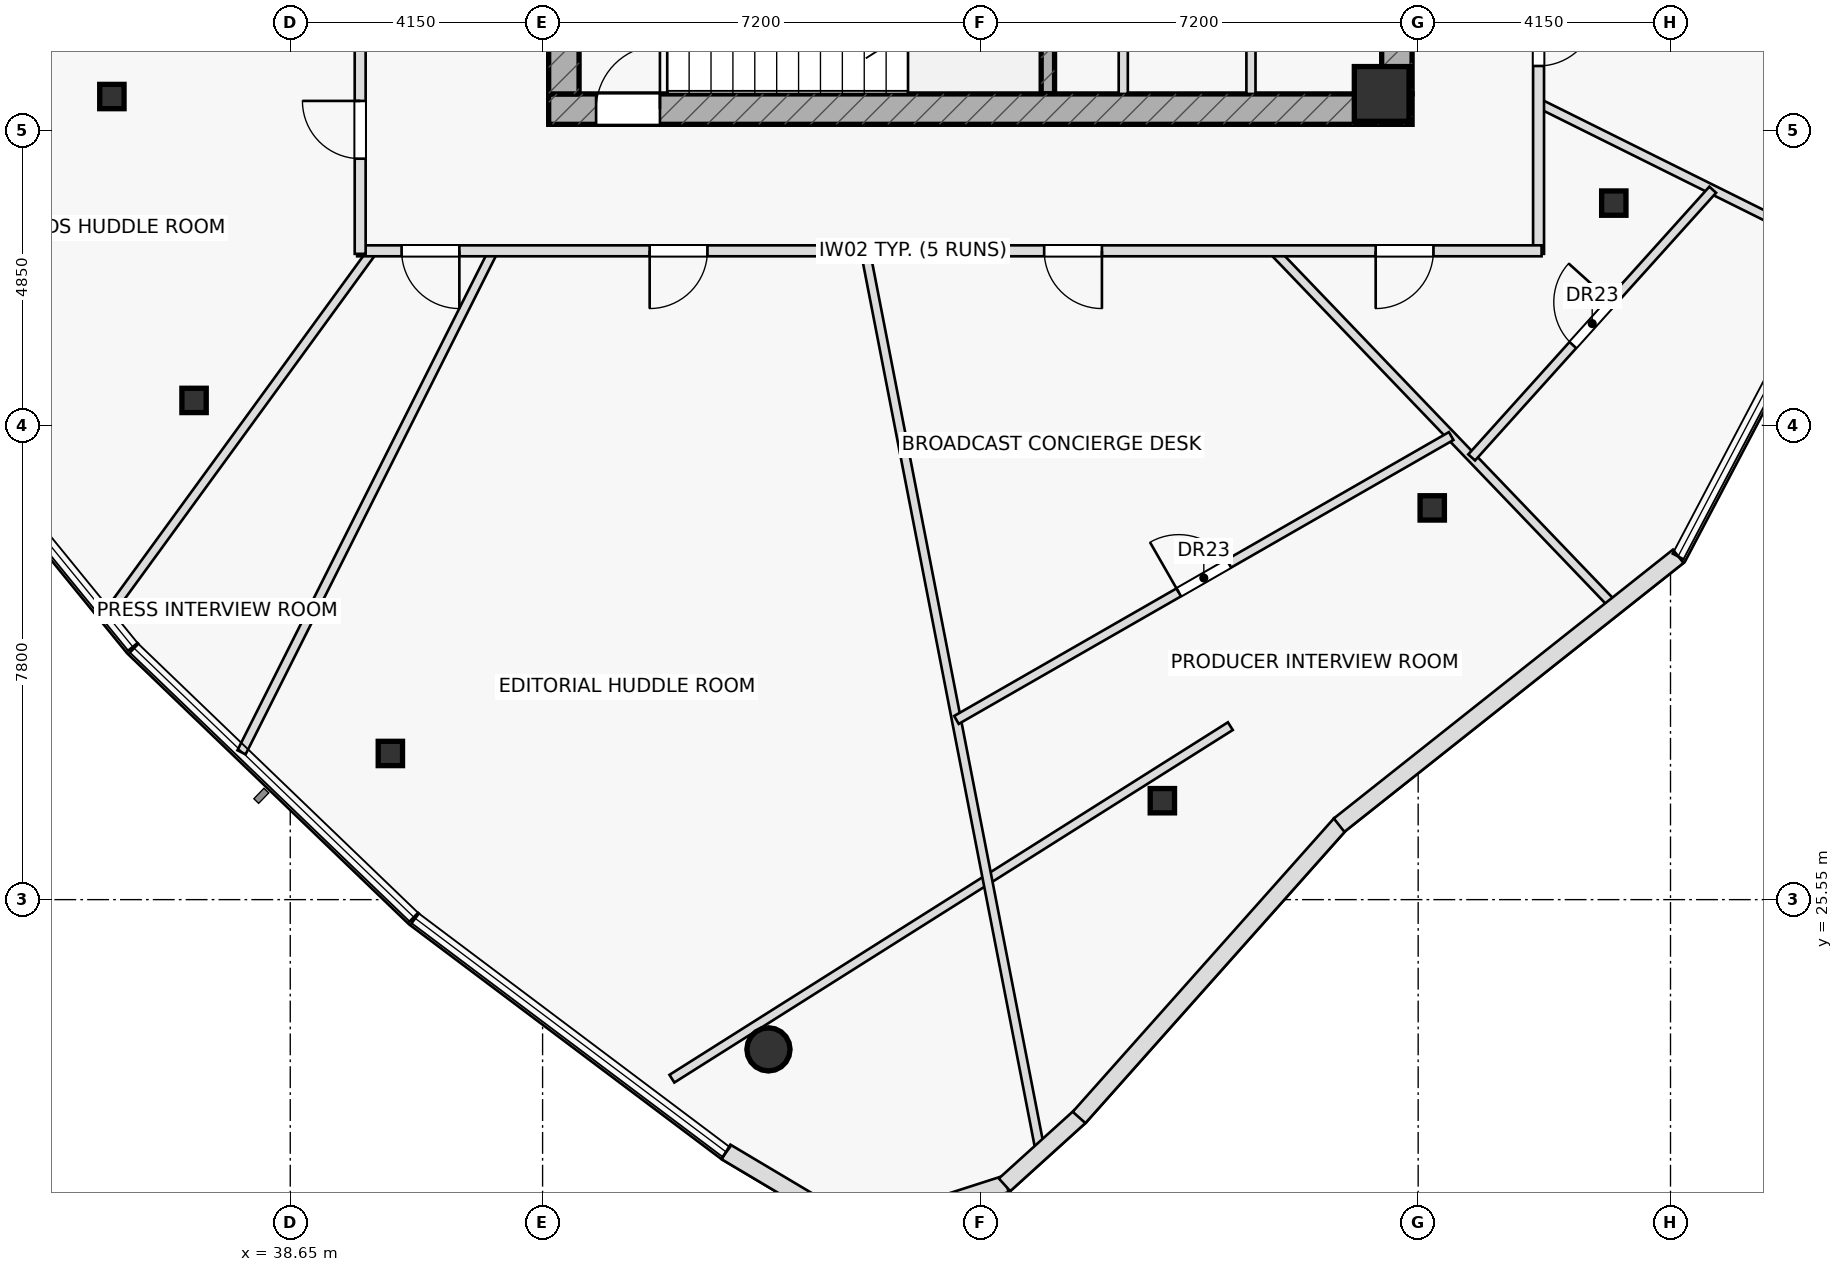
"""IFC4 building model, lengths in metres.
Left out: names, types, materials, properties, quantities, classifications, styles, units other than length and angle.
Written with IfcOpenShell. Run it as: python <this file> out.ifc"""

import sys

from ifc_helpers import new_model, si_unit, direction, frame, frame_2d, origin, origin_2d, place, context, subcontext, project, spatial, rectangle, hollow_rectangle, hollow_circle, extrude, element, fill, save


model = new_model("IFC4")
c1 = context("Model", 3, precision=1e-05, world=origin(), true_north=direction((0.0, 1.0)))
c2 = subcontext(c1, "Body", "Model", "MODEL_VIEW")
j1 = project(units=[si_unit("LENGTHUNIT", "METRE"), si_unit("PLANEANGLEUNIT", "RADIAN")], contexts=[c1])
p1 = place(None, origin())
s1 = spatial("IfcSite", under=j1, at=p1, CompositionType="ELEMENT")
p2 = place(p1, origin())
s2 = spatial("IfcBuilding", under=s1, at=p2, CompositionType="ELEMENT")
p3 = place(p2, frame((0.0, 0.0, 321.5)))
s3 = spatial("IfcBuildingStorey", under=s2, at=p3, CompositionType="ELEMENT", Elevation=321.5)
p4 = place(p3, frame((51.11, 38.8, 0.0), z_axis=(0.0, 0.0, 1.0), x_axis=(0.0, 1.0, 0.0)))
e1 = element("IfcWall", 1, at=p4, inside=s3, PredefinedType="SHEAR", context=c2, shape_type="SweptSolid", body=[
    extrude(rectangle(XDim=3.1, YDim=0.22, at=frame_2d((1.55, 0.0))), origin(), (0.0, 0.0, 1.0), 3.55),
])
p5 = place(p3, frame((42.9, 38.55, 0.0), z_axis=(0.0, 0.0, 1.0), x_axis=(1.0, 0.0, 0.0)))
e2 = element("IfcWall", 2, at=p5, inside=s3, PredefinedType="SHEAR", context=c2, shape_type="SweptSolid", body=[
    extrude(rectangle(XDim=14.2, YDim=0.5, at=frame_2d((7.1, 0.0))), origin(), (0.0, 0.0, 1.0), 3.55),
])
p6 = place(p5, frame((0.78, 0.0, 0.0)))
e3 = element("IfcOpeningElement", 3, at=p6, cuts=e2, PredefinedType="OPENING", context=c2, shape_type="SweptSolid", body=[
    extrude(rectangle(XDim=1.05, YDim=2.2, at=frame_2d((0.525, 1.1))), frame((0.0, 0.26, 0.0), z_axis=(0.0, -1.0, 0.0), x_axis=(1.0, 0.0, 0.0)), (0.0, 0.0, 1.0), 0.52),
])
p7 = place(p3, frame((43.15, 38.8, 0.0), z_axis=(0.0, 0.0, 1.0), x_axis=(0.0, 1.0, 0.0)))
e4 = element("IfcWall", 4, at=p7, inside=s3, PredefinedType="SHEAR", context=c2, shape_type="SweptSolid", body=[
    extrude(rectangle(XDim=12.4, YDim=0.5, at=frame_2d((6.2, 0.0))), origin(), (0.0, 0.0, 1.0), 3.55),
])
p8 = place(p3, frame((56.85, 38.8, 0.0), z_axis=(0.0, 0.0, 1.0), x_axis=(0.0, 1.0, 0.0)))
e5 = element("IfcWall", 5, at=p8, inside=s3, PredefinedType="SHEAR", context=c2, shape_type="SweptSolid", body=[
    extrude(rectangle(XDim=12.4, YDim=0.5, at=frame_2d((6.2, 0.0))), origin(), (0.0, 0.0, 1.0), 3.55),
])
p9 = place(p8, frame((3.85, 0.0, 0.0)))
e6 = element("IfcOpeningElement", 6, at=p9, cuts=e5, PredefinedType="OPENING", context=c2, shape_type="SweptSolid", body=[
    extrude(rectangle(XDim=1.5, YDim=2.2, at=frame_2d((0.75, 1.1))), frame((0.0, 0.26, 0.0), z_axis=(0.0, -1.0, 0.0), x_axis=(1.0, 0.0, 0.0)), (0.0, 0.0, 1.0), 0.52),
])
p10 = place(p3, frame((56.6, 38.8, 0.0), z_axis=(0.0, 0.0, 1.0), x_axis=(1.0, 0.0, 0.0)))
e7 = element("IfcColumn", 7, at=p10, inside=s3, PredefinedType="COLUMN", context=c2, shape_type="SweptSolid", body=[
    extrude(rectangle(XDim=0.9, YDim=0.9, at=origin_2d()), origin(), (0.0, 0.0, 1.0), 3.55),
])
for number, where, z_axis, x_axis in (
    (8, (35.717, 38.757, 0.0), (0.0, 0.0, 1.0), (1.0, 0.0, 0.0)),
    (9, (37.068, 33.76, 0.0), (0.0, 0.0, 1.0), (1.0, 0.0, 0.0)),
    (10, (40.296, 27.954, 0.0), (0.0, 0.0, 1.0), (1.0, 0.0, 0.0)),
):
    element("IfcColumn", number, at=place(p3, frame(where, z_axis=z_axis, x_axis=x_axis)), inside=s3, PredefinedType="COLUMN", context=c2, shape_type="SweptSolid", body=[
        extrude(hollow_rectangle(XDim=0.4, YDim=0.4, WallThickness=0.025, at=origin_2d()), origin(), (0.0, 0.0, 1.0), 3.55),
    ])
p11 = place(p3, frame((46.515, 23.087, 0.0), z_axis=(0.0, 0.0, 1.0), x_axis=(1.0, 0.0, 0.0)))
e11 = element("IfcColumn", 11, at=p11, inside=s3, PredefinedType="COLUMN", context=c2, shape_type="SweptSolid", body=[
    extrude(hollow_circle(Radius=0.355, WallThickness=0.032, at=origin_2d()), origin(), (0.0, 0.0, 1.0), 3.55),
])
for number, where, z_axis, x_axis in (
    (12, (52.993, 27.177, 0.0), (0.0, 0.0, 1.0), (1.0, 0.0, 0.0)),
    (13, (57.431, 31.992, 0.0), (0.0, 0.0, 1.0), (1.0, 0.0, 0.0)),
    (14, (60.417, 37.004, 0.0), (0.0, 0.0, 1.0), (1.0, 0.0, 0.0)),
):
    element("IfcColumn", number, at=place(p3, frame(where, z_axis=z_axis, x_axis=x_axis)), inside=s3, PredefinedType="COLUMN", context=c2, shape_type="SweptSolid", body=[
        extrude(hollow_rectangle(XDim=0.4, YDim=0.4, WallThickness=0.025, at=origin_2d()), origin(), (0.0, 0.0, 1.0), 3.55),
    ])
for number, where, z_axis, x_axis in (
    (15, (52.35, 38.8, 0.0), (0.0, 0.0, 1.0), (0.0, 1.0, 0.0)),
    (16, (54.45, 38.8, 0.0), (0.0, 0.0, 1.0), (0.0, 1.0, 0.0)),
):
    element("IfcWall", number, at=place(p3, frame(where, z_axis=z_axis, x_axis=x_axis)), inside=s3, PredefinedType="PARTITIONING", context=c2, shape_type="SweptSolid", body=[
        extrude(rectangle(XDim=3.1, YDim=0.15, at=frame_2d((1.55, 0.0))), origin(), (0.0, 0.0, 1.0), 3.55),
    ])
p12 = place(p3, frame((44.927, 22.605, 0.0), z_axis=(0.0, 0.0, 1.0), x_axis=(0.845624548895, 0.533778158326, 0.0)))
e17 = element("IfcWall", 17, at=p12, inside=s3, PredefinedType="PARTITIONING", context=c2, shape_type="SweptSolid", body=[
    extrude(rectangle(XDim=10.861, YDim=0.15, at=frame_2d((5.431, 0.0))), origin(), (0.0, 0.0, 1.0), 3.075),
])
p13 = place(p3, frame((48.107, 36.22, 0.0), z_axis=(0.0, 0.0, 1.0), x_axis=(0.190804372381, -0.981628082056, 0.0)))
e18 = element("IfcWall", 18, at=p13, inside=s3, PredefinedType="PARTITIONING", context=c2, shape_type="SweptSolid", body=[
    extrude(rectangle(XDim=15.114, YDim=0.15, at=frame_2d((7.557, 0.0))), origin(), (0.0, 0.0, 1.0), 3.125),
])
p14 = place(p3, frame((54.821, 36.22, 0.0), z_axis=(0.0, 0.0, 1.0), x_axis=(0.69220120833, -0.721704570573, 0.0)))
e19 = element("IfcWall", 19, at=p14, inside=s3, PredefinedType="PARTITIONING", context=c2, shape_type="SweptSolid", body=[
    extrude(rectangle(XDim=8.118, YDim=0.15, at=frame_2d((4.059, 0.0))), origin(), (0.0, 0.0, 1.0), 3.075),
])
p15 = place(p3, frame((59.18, 38.648, 0.0), z_axis=(0.0, 0.0, 1.0), x_axis=(0.895495908624, -0.445069744689, 0.0)))
e20 = element("IfcWall", 20, at=p15, inside=s3, PredefinedType="PARTITIONING", context=c2, shape_type="SweptSolid", body=[
    extrude(rectangle(XDim=5.515, YDim=0.15, at=frame_2d((2.758, 0.0))), origin(), (0.0, 0.0, 1.0), 3.125),
])
p16 = place(p3, frame((37.08, 41.924, 0.0), z_axis=(0.0, 0.0, 1.0), x_axis=(-0.949625538611, -0.313386879778, 0.0)))
e21 = element("IfcWall", 21, at=p16, inside=s3, PredefinedType="PARTITIONING", context=c2, shape_type="SweptSolid", body=[
    extrude(rectangle(XDim=8.409, YDim=0.15, at=frame_2d((4.205, 0.0))), origin(), (0.0, 0.0, 1.0), 3.125),
])
p17 = place(p16, frame((1.35, 0.0, 0.0)))
e22 = element("IfcOpeningElement", 22, at=p17, cuts=e21, PredefinedType="OPENING", context=c2, shape_type="SweptSolid", body=[
    extrude(rectangle(XDim=0.95, YDim=2.05, at=frame_2d((0.475, 1.025))), frame((0.0, 0.085, 0.0), z_axis=(0.0, -1.0, 0.0), x_axis=(1.0, 0.0, 0.0)), (0.0, 0.0, 1.0), 0.17),
])
p18 = place(p3, frame((40.005, 36.22, 0.0), z_axis=(0.0, 0.0, 1.0), x_axis=(-0.58875799432, -0.808309361646, 0.0)))
e23 = element("IfcWall", 23, at=p18, inside=s3, PredefinedType="PARTITIONING", context=c2, shape_type="SweptSolid", body=[
    extrude(rectangle(XDim=7.426, YDim=0.15, at=frame_2d((3.713, 0.0))), origin(), (0.0, 0.0, 1.0), 3.075),
])
p19 = place(p3, frame((41.99, 36.22, 0.0), z_axis=(0.0, 0.0, 1.0), x_axis=(-0.448789550097, -0.893637476678, 0.0)))
e24 = element("IfcWall", 24, at=p19, inside=s3, PredefinedType="PARTITIONING", context=c2, shape_type="SweptSolid", body=[
    extrude(rectangle(XDim=9.229, YDim=0.15, at=frame_2d((4.615, 0.0))), origin(), (0.0, 0.0, 1.0), 3.125),
])
p20 = place(p3, frame((49.606, 28.505, 0.0), z_axis=(0.0, 0.0, 1.0), x_axis=(0.867373766806, 0.497657260227, 0.0)))
e25 = element("IfcWall", 25, at=p20, inside=s3, PredefinedType="PARTITIONING", context=c2, shape_type="SweptSolid", body=[
    extrude(rectangle(XDim=9.381, YDim=0.15, at=frame_2d((4.69, 0.0))), origin(), (0.0, 0.0, 1.0), 3.075),
])
p21 = place(p20, frame((4.215, 0.0, 0.0)))
e26 = element("IfcOpeningElement", 26, at=p21, cuts=e25, PredefinedType="OPENING", context=c2, shape_type="SweptSolid", body=[
    extrude(rectangle(XDim=0.95, YDim=2.05, at=frame_2d((0.475, 1.025))), frame((0.0, 0.085, 0.0), z_axis=(0.0, -1.0, 0.0), x_axis=(1.0, 0.0, 0.0)), (0.0, 0.0, 1.0), 0.17),
])
p22 = place(p3, frame((58.08, 32.822, 0.0), z_axis=(0.0, 0.0, 1.0), x_axis=(0.669174172191, 0.743105596314, 0.0)))
e27 = element("IfcWall", 27, at=p22, inside=s3, PredefinedType="PARTITIONING", context=c2, shape_type="SweptSolid", body=[
    extrude(rectangle(XDim=5.924, YDim=0.15, at=frame_2d((2.962, 0.0))), origin(), (0.0, 0.0, 1.0), 3.125),
])
p23 = place(p22, frame((2.487, 0.0, 0.0)))
e28 = element("IfcOpeningElement", 28, at=p23, cuts=e27, PredefinedType="OPENING", context=c2, shape_type="SweptSolid", body=[
    extrude(rectangle(XDim=0.95, YDim=2.05, at=frame_2d((0.475, 1.025))), frame((0.0, 0.085, 0.0), z_axis=(0.0, -1.0, 0.0), x_axis=(1.0, 0.0, 0.0)), (0.0, 0.0, 1.0), 0.17),
])
p24 = place(p3, frame((59.18, 41.1, 0.0), z_axis=(0.0, 0.0, 1.0), x_axis=(0.0, -1.0, 0.0)))
e29 = element("IfcWall", 29, at=p24, inside=s3, PredefinedType="PARTITIONING", context=c2, shape_type="SweptSolid", body=[
    extrude(rectangle(XDim=4.93, YDim=0.18, at=frame_2d((2.465, 0.0))), origin(), (0.0, 0.0, 1.0), 3.325),
])
p25 = place(p24, frame((0.89, 0.0, 0.0)))
e30 = element("IfcOpeningElement", 30, at=p25, cuts=e29, PredefinedType="OPENING", context=c2, shape_type="SweptSolid", body=[
    extrude(rectangle(XDim=0.95, YDim=2.05, at=frame_2d((0.475, 1.025))), frame((0.0, 0.1, 0.0), z_axis=(0.0, -1.0, 0.0), x_axis=(1.0, 0.0, 0.0)), (0.0, 0.0, 1.0), 0.2),
])
p26 = place(p3, frame((59.23, 36.22, 0.0), z_axis=(0.0, 0.0, 1.0), x_axis=(-1.0, 0.0, 0.0)))
e31 = element("IfcWall", 31, at=p26, inside=s3, PredefinedType="PARTITIONING", context=c2, shape_type="SweptSolid", body=[
    extrude(rectangle(XDim=19.48, YDim=0.18, at=frame_2d((9.74, 0.0))), origin(), (0.0, 0.0, 1.0), 3.075),
])
p27 = place(p26, frame((1.779, 0.0, 0.0)))
e32 = element("IfcOpeningElement", 32, at=p27, cuts=e31, PredefinedType="OPENING", context=c2, shape_type="SweptSolid", body=[
    extrude(rectangle(XDim=0.95, YDim=2.05, at=frame_2d((0.475, 1.025))), frame((0.0, 0.1, 0.0), z_axis=(0.0, -1.0, 0.0), x_axis=(1.0, 0.0, 0.0)), (0.0, 0.0, 1.0), 0.2),
])
p28 = place(p26, frame((7.231, 0.0, 0.0)))
e33 = element("IfcOpeningElement", 33, at=p28, cuts=e31, PredefinedType="OPENING", context=c2, shape_type="SweptSolid", body=[
    extrude(rectangle(XDim=0.95, YDim=2.05, at=frame_2d((0.475, 1.025))), frame((0.0, 0.1, 0.0), z_axis=(0.0, -1.0, 0.0), x_axis=(1.0, 0.0, 0.0)), (0.0, 0.0, 1.0), 0.2),
])
p29 = place(p26, frame((13.719, 0.0, 0.0)))
e34 = element("IfcOpeningElement", 34, at=p29, cuts=e31, PredefinedType="OPENING", context=c2, shape_type="SweptSolid", body=[
    extrude(rectangle(XDim=0.95, YDim=2.05, at=frame_2d((0.475, 1.025))), frame((0.0, 0.1, 0.0), z_axis=(0.0, -1.0, 0.0), x_axis=(1.0, 0.0, 0.0)), (0.0, 0.0, 1.0), 0.2),
])
p30 = place(p26, frame((17.799, 0.0, 0.0)))
e35 = element("IfcOpeningElement", 35, at=p30, cuts=e31, PredefinedType="OPENING", context=c2, shape_type="SweptSolid", body=[
    extrude(rectangle(XDim=0.95, YDim=2.05, at=frame_2d((0.475, 1.025))), frame((0.0, 0.1, 0.0), z_axis=(0.0, -1.0, 0.0), x_axis=(1.0, 0.0, 0.0)), (0.0, 0.0, 1.0), 0.2),
])
p31 = place(p3, frame((39.8, 36.17, 0.0), z_axis=(0.0, 0.0, 1.0), x_axis=(0.0, 1.0, 0.0)))
e36 = element("IfcWall", 36, at=p31, inside=s3, PredefinedType="PARTITIONING", context=c2, shape_type="SweptSolid", body=[
    extrude(rectangle(XDim=4.08, YDim=0.18, at=frame_2d((2.04, 0.0))), origin(), (0.0, 0.0, 1.0), 3.325),
])
p32 = place(p31, frame((1.565, 0.0, 0.0)))
e37 = element("IfcOpeningElement", 37, at=p32, cuts=e36, PredefinedType="OPENING", context=c2, shape_type="SweptSolid", body=[
    extrude(rectangle(XDim=0.95, YDim=2.05, at=frame_2d((0.475, 1.025))), frame((0.0, 0.1, 0.0), z_axis=(0.0, -1.0, 0.0), x_axis=(1.0, 0.0, 0.0)), (0.0, 0.0, 1.0), 0.2),
])
p33 = place(p3, frame((45.817, 21.401, 0.0), z_axis=(0.0, 0.0, 1.0), x_axis=(0.859459534557, -0.51120378369, 0.0)))
e38 = element("IfcWall", 38, at=p33, inside=s3, PredefinedType="STANDARD", context=c2, shape_type="SweptSolid", body=[
    extrude(rectangle(XDim=1.671, YDim=0.28, at=frame_2d((0.835, 0.0))), origin(), (0.0, 0.0, 1.0), 3.55),
])
p34 = place(p3, frame((48.844, 20.367, 0.0), z_axis=(0.0, 0.0, 1.0), x_axis=(0.951856918908, 0.306542665752, 0.0)))
e39 = element("IfcWall", 39, at=p34, inside=s3, PredefinedType="STANDARD", context=c2, shape_type="SweptSolid", body=[
    extrude(rectangle(XDim=1.659, YDim=0.28, at=frame_2d((0.83, 0.0))), origin(), (0.0, 0.0, 1.0), 3.55),
])
p35 = place(p3, frame((50.398, 20.861, 0.0), z_axis=(0.0, 0.0, 1.0), x_axis=(0.741370646034, 0.671095794354, 0.0)))
e40 = element("IfcWall", 40, at=p35, inside=s3, PredefinedType="STANDARD", context=c2, shape_type="SweptSolid", body=[
    extrude(rectangle(XDim=1.681, YDim=0.28, at=frame_2d((0.841, 0.0))), origin(), (0.0, 0.0, 1.0), 3.55),
])
p36 = place(p3, frame((51.623, 21.968, 0.0), z_axis=(0.0, 0.0, 1.0), x_axis=(0.664900489845, 0.74693195045, 0.0)))
e41 = element("IfcWall", 41, at=p36, inside=s3, PredefinedType="STANDARD", context=c2, shape_type="SweptSolid", body=[
    extrude(rectangle(XDim=6.464, YDim=0.28, at=frame_2d((3.232, 0.0))), origin(), (0.0, 0.0, 1.0), 3.55),
])
p37 = place(p3, frame((55.9, 26.775, 0.0), z_axis=(0.0, 0.0, 1.0), x_axis=(0.783668684823, 0.621179034118, 0.0)))
e42 = element("IfcWall", 42, at=p37, inside=s3, PredefinedType="STANDARD", context=c2, shape_type="SweptSolid", body=[
    extrude(rectangle(XDim=7.117, YDim=0.28, at=frame_2d((3.559, 0.0))), origin(), (0.0, 0.0, 1.0), 3.55),
])
p38 = place(p6, origin())
e43 = element("IfcDoor", 43, at=p38, inside=s3, OperationType="SINGLE_SWING_RIGHT", PredefinedType="DOOR", context=c2, shape_type="SweptSolid", body=[
    extrude(rectangle(XDim=1.05, YDim=2.2, at=frame_2d((0.525, 1.1))), frame((0.0, 0.025, 0.0), z_axis=(0.0, -1.0, 0.0), x_axis=(1.0, 0.0, 0.0)), (0.0, 0.0, 1.0), 0.05),
])
fill(e3, e43)
p39 = place(p21, origin())
e44 = element("IfcDoor", 44, at=p39, inside=s3, OperationType="SINGLE_SWING_LEFT", PredefinedType="DOOR", context=c2, shape_type="SweptSolid", body=[
    extrude(rectangle(XDim=0.95, YDim=2.05, at=frame_2d((0.475, 1.025))), frame((0.0, 0.025, 0.0), z_axis=(0.0, -1.0, 0.0), x_axis=(1.0, 0.0, 0.0)), (0.0, 0.0, 1.0), 0.05),
])
fill(e26, e44)
p40 = place(p23, origin())
e45 = element("IfcDoor", 45, at=p40, inside=s3, OperationType="SINGLE_SWING_RIGHT", PredefinedType="DOOR", context=c2, shape_type="SweptSolid", body=[
    extrude(rectangle(XDim=0.95, YDim=2.05, at=frame_2d((0.475, 1.025))), frame((0.0, 0.025, 0.0), z_axis=(0.0, -1.0, 0.0), x_axis=(1.0, 0.0, 0.0)), (0.0, 0.0, 1.0), 0.05),
])
fill(e28, e45)
p41 = place(p25, origin())
e46 = element("IfcDoor", 46, at=p41, inside=s3, OperationType="SINGLE_SWING_LEFT", PredefinedType="DOOR", context=c2, shape_type="SweptSolid", body=[
    extrude(rectangle(XDim=0.95, YDim=2.05, at=frame_2d((0.475, 1.025))), frame((0.0, 0.025, 0.0), z_axis=(0.0, -1.0, 0.0), x_axis=(1.0, 0.0, 0.0)), (0.0, 0.0, 1.0), 0.05),
])
fill(e30, e46)
p42 = place(p27, origin())
e47 = element("IfcDoor", 47, at=p42, inside=s3, OperationType="SINGLE_SWING_RIGHT", PredefinedType="DOOR", context=c2, shape_type="SweptSolid", body=[
    extrude(rectangle(XDim=0.95, YDim=2.05, at=frame_2d((0.475, 1.025))), frame((0.0, 0.025, 0.0), z_axis=(0.0, -1.0, 0.0), x_axis=(1.0, 0.0, 0.0)), (0.0, 0.0, 1.0), 0.05),
])
fill(e32, e47)
p43 = place(p28, origin())
e48 = element("IfcDoor", 48, at=p43, inside=s3, OperationType="SINGLE_SWING_LEFT", PredefinedType="DOOR", context=c2, shape_type="SweptSolid", body=[
    extrude(rectangle(XDim=0.95, YDim=2.05, at=frame_2d((0.475, 1.025))), frame((0.0, 0.025, 0.0), z_axis=(0.0, -1.0, 0.0), x_axis=(1.0, 0.0, 0.0)), (0.0, 0.0, 1.0), 0.05),
])
fill(e33, e48)
p44 = place(p29, origin())
e49 = element("IfcDoor", 49, at=p44, inside=s3, OperationType="SINGLE_SWING_RIGHT", PredefinedType="DOOR", context=c2, shape_type="SweptSolid", body=[
    extrude(rectangle(XDim=0.95, YDim=2.05, at=frame_2d((0.475, 1.025))), frame((0.0, 0.025, 0.0), z_axis=(0.0, -1.0, 0.0), x_axis=(1.0, 0.0, 0.0)), (0.0, 0.0, 1.0), 0.05),
])
fill(e34, e49)
p45 = place(p30, origin())
e50 = element("IfcDoor", 50, at=p45, inside=s3, OperationType="SINGLE_SWING_LEFT", PredefinedType="DOOR", context=c2, shape_type="SweptSolid", body=[
    extrude(rectangle(XDim=0.95, YDim=2.05, at=frame_2d((0.475, 1.025))), frame((0.0, 0.025, 0.0), z_axis=(0.0, -1.0, 0.0), x_axis=(1.0, 0.0, 0.0)), (0.0, 0.0, 1.0), 0.05),
])
fill(e35, e50)
p46 = place(p32, origin())
e51 = element("IfcDoor", 51, at=p46, inside=s3, OperationType="SINGLE_SWING_RIGHT", PredefinedType="DOOR", context=c2, shape_type="SweptSolid", body=[
    extrude(rectangle(XDim=0.95, YDim=2.05, at=frame_2d((0.475, 1.025))), frame((0.0, 0.025, 0.0), z_axis=(0.0, -1.0, 0.0), x_axis=(1.0, 0.0, 0.0)), (0.0, 0.0, 1.0), 0.05),
])
fill(e37, e51)
save(model, sys.argv[1])
